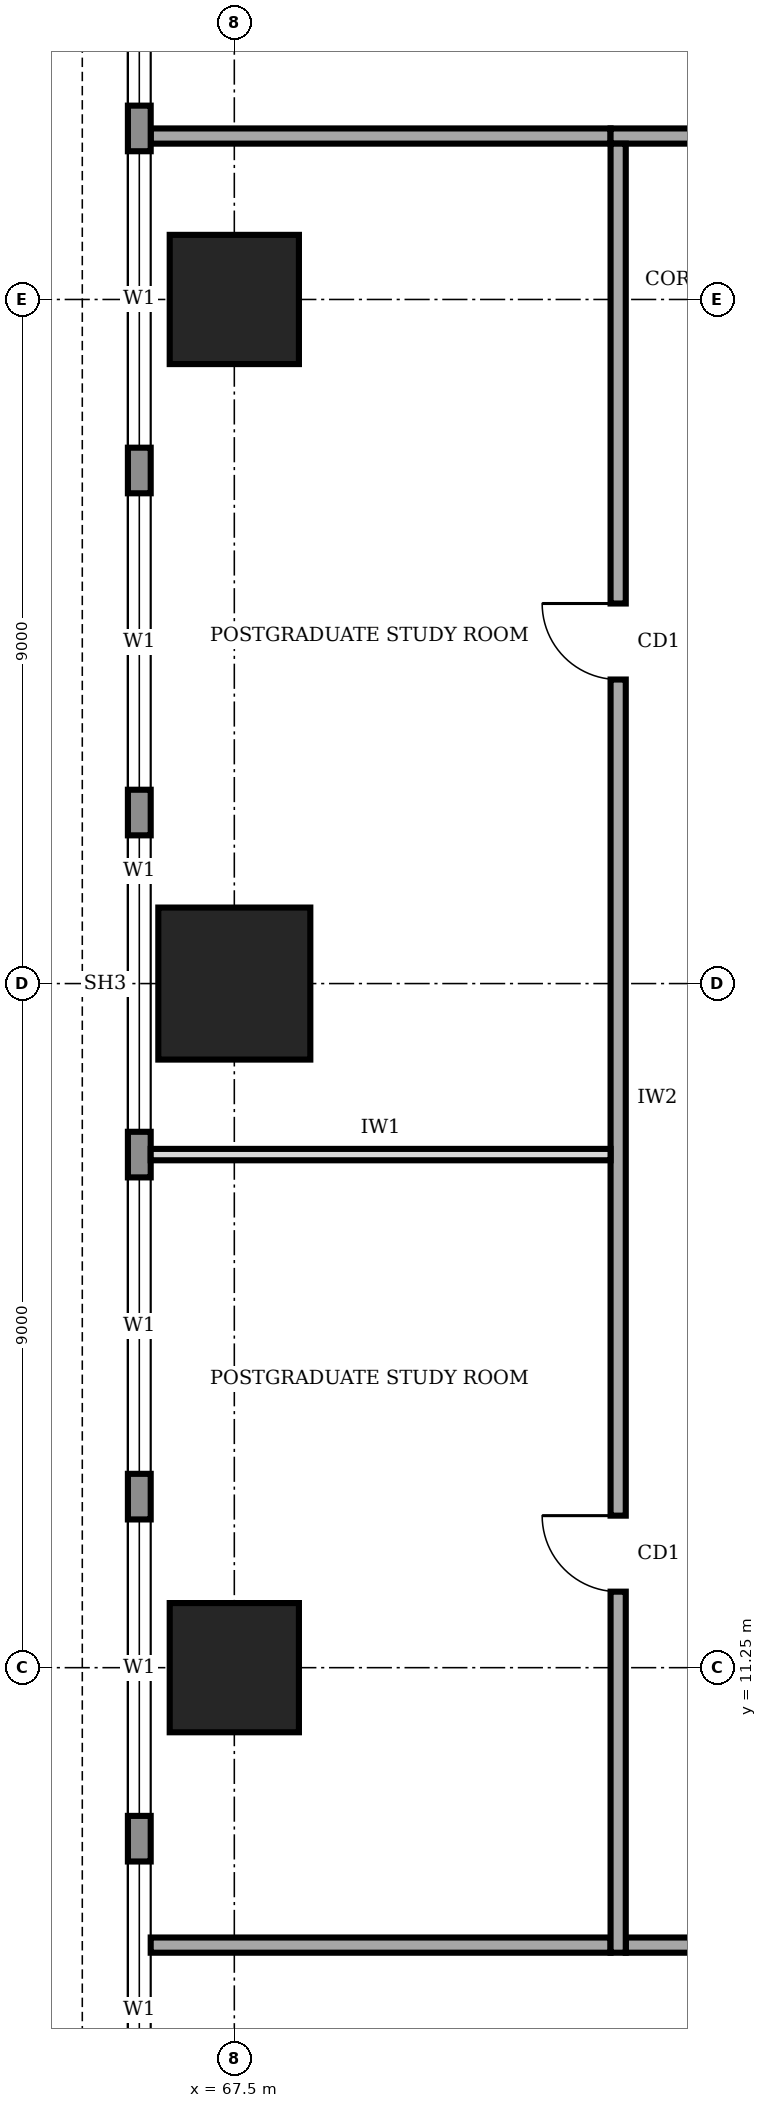
"""IFC4 building model, lengths in metres.
Left out: names, types, materials, properties, quantities, classifications, styles, units other than length and angle.
Written with IfcOpenShell. Run it as: python <this file> out.ifc"""

import sys

from ifc_helpers import new_model, si_unit, direction, frame, frame_2d, origin, origin_2d, place, context, subcontext, project, spatial, rectangle, extrude, element, fill, save


model = new_model("IFC4")
c1 = context("Model", 3, precision=1e-05, world=origin(), true_north=direction((0.0, 1.0)))
c2 = subcontext(c1, "Body", "Model", "MODEL_VIEW")
j1 = project(units=[si_unit("LENGTHUNIT", "METRE"), si_unit("PLANEANGLEUNIT", "RADIAN")], contexts=[c1])
p1 = place(None, origin())
s1 = spatial("IfcSite", under=j1, at=p1, CompositionType="ELEMENT")
p2 = place(p1, origin())
s2 = spatial("IfcBuilding", under=s1, at=p2, CompositionType="ELEMENT")
p3 = place(p2, frame((0.0, 0.0, 209.0)))
s3 = spatial("IfcBuildingStorey", under=s2, at=p3, CompositionType="ELEMENT", Elevation=209.0)
p4 = place(p3, frame((67.5, 11.25, 0.0), z_axis=(0.0, 0.0, 1.0), x_axis=(1.0, 0.0, 0.0)))
e1 = element("IfcColumn", 1, at=p4, inside=s3, PredefinedType="COLUMN", context=c2, shape_type="SweptSolid", body=[
    extrude(rectangle(XDim=1.7, YDim=1.7, at=origin_2d()), origin(), (0.0, 0.0, 1.0), 4.0),
])
p5 = place(p3, frame((67.5, 20.25, 0.0), z_axis=(0.0, 0.0, 1.0), x_axis=(1.0, 0.0, 0.0)))
e2 = element("IfcColumn", 2, at=p5, inside=s3, PredefinedType="COLUMN", context=c2, shape_type="SweptSolid", body=[
    extrude(rectangle(XDim=2.0, YDim=2.0, at=origin_2d()), origin(), (0.0, 0.0, 1.0), 4.0),
])
p6 = place(p3, frame((67.5, 29.25, 0.0), z_axis=(0.0, 0.0, 1.0), x_axis=(1.0, 0.0, 0.0)))
e3 = element("IfcColumn", 3, at=p6, inside=s3, PredefinedType="COLUMN", context=c2, shape_type="SweptSolid", body=[
    extrude(rectangle(XDim=1.7, YDim=1.7, at=origin_2d()), origin(), (0.0, 0.0, 1.0), 4.0),
])
p7 = place(p3, frame((66.25, 37.18, 0.0), z_axis=(0.0, 0.0, 1.0), x_axis=(0.0, -1.0, 0.0)))
e4 = element("IfcWall", 4, at=p7, inside=s3, PredefinedType="STANDARD", context=c2, shape_type="SweptSolid", body=[
    extrude(rectangle(XDim=33.86, YDim=0.3, at=frame_2d((16.93, 0.0))), origin(), (0.0, 0.0, 1.0), 3.75),
])
p8 = place(p7, frame((28.48, 0.0, 0.9)))
e5 = element("IfcOpeningElement", 5, at=p8, cuts=e4, PredefinedType="OPENING", context=c2, shape_type="SweptSolid", body=[
    extrude(rectangle(XDim=3.9, YDim=2.2, at=frame_2d((1.95, 1.1))), frame((0.0, 0.16, 0.0), z_axis=(0.0, -1.0, 0.0), x_axis=(1.0, 0.0, 0.0)), (0.0, 0.0, 1.0), 0.32),
])
p9 = place(p7, frame((23.98, 0.0, 0.9)))
e6 = element("IfcOpeningElement", 6, at=p9, cuts=e4, PredefinedType="OPENING", context=c2, shape_type="SweptSolid", body=[
    extrude(rectangle(XDim=3.9, YDim=2.2, at=frame_2d((1.95, 1.1))), frame((0.0, 0.16, 0.0), z_axis=(0.0, -1.0, 0.0), x_axis=(1.0, 0.0, 0.0)), (0.0, 0.0, 1.0), 0.32),
])
p10 = place(p7, frame((19.48, 0.0, 0.9)))
e7 = element("IfcOpeningElement", 7, at=p10, cuts=e4, PredefinedType="OPENING", context=c2, shape_type="SweptSolid", body=[
    extrude(rectangle(XDim=3.9, YDim=2.2, at=frame_2d((1.95, 1.1))), frame((0.0, 0.16, 0.0), z_axis=(0.0, -1.0, 0.0), x_axis=(1.0, 0.0, 0.0)), (0.0, 0.0, 1.0), 0.32),
])
p11 = place(p7, frame((14.98, 0.0, 0.9)))
e8 = element("IfcOpeningElement", 8, at=p11, cuts=e4, PredefinedType="OPENING", context=c2, shape_type="SweptSolid", body=[
    extrude(rectangle(XDim=3.9, YDim=2.2, at=frame_2d((1.95, 1.1))), frame((0.0, 0.16, 0.0), z_axis=(0.0, -1.0, 0.0), x_axis=(1.0, 0.0, 0.0)), (0.0, 0.0, 1.0), 0.32),
])
p12 = place(p7, frame((10.48, 0.0, 0.9)))
e9 = element("IfcOpeningElement", 9, at=p12, cuts=e4, PredefinedType="OPENING", context=c2, shape_type="SweptSolid", body=[
    extrude(rectangle(XDim=3.9, YDim=2.2, at=frame_2d((1.95, 1.1))), frame((0.0, 0.16, 0.0), z_axis=(0.0, -1.0, 0.0), x_axis=(1.0, 0.0, 0.0)), (0.0, 0.0, 1.0), 0.32),
])
p13 = place(p7, frame((5.98, 0.0, 0.9)))
e10 = element("IfcOpeningElement", 10, at=p13, cuts=e4, PredefinedType="OPENING", context=c2, shape_type="SweptSolid", body=[
    extrude(rectangle(XDim=3.9, YDim=2.2, at=frame_2d((1.95, 1.1))), frame((0.0, 0.16, 0.0), z_axis=(0.0, -1.0, 0.0), x_axis=(1.0, 0.0, 0.0)), (0.0, 0.0, 1.0), 0.32),
])
p14 = place(p7, frame((1.48, 0.0, 0.9)))
e11 = element("IfcOpeningElement", 11, at=p14, cuts=e4, PredefinedType="OPENING", context=c2, shape_type="SweptSolid", body=[
    extrude(rectangle(XDim=3.9, YDim=2.2, at=frame_2d((1.95, 1.1))), frame((0.0, 0.16, 0.0), z_axis=(0.0, -1.0, 0.0), x_axis=(1.0, 0.0, 0.0)), (0.0, 0.0, 1.0), 0.32),
])
p15 = place(p3, frame((72.65, 7.6, 0.0), z_axis=(0.0, 0.0, 1.0), x_axis=(1.0, 0.0, 0.0)))
e12 = element("IfcWall", 12, at=p15, inside=s3, PredefinedType="SOLIDWALL", context=c2, shape_type="SweptSolid", body=[
    extrude(rectangle(XDim=16.9, YDim=0.2, at=frame_2d((8.45, 0.0))), origin(), (0.0, 0.0, 1.0), 3.75),
])
p16 = place(p15, frame((7.45, 0.0, 0.0)))
e13 = element("IfcOpeningElement", 13, at=p16, cuts=e12, PredefinedType="OPENING", context=c2, shape_type="SweptSolid", body=[
    extrude(rectangle(XDim=1.8, YDim=2.1, at=frame_2d((0.9, 1.05))), frame((0.0, 0.11, 0.0), z_axis=(0.0, -1.0, 0.0), x_axis=(1.0, 0.0, 0.0)), (0.0, 0.0, 1.0), 0.22),
])
p17 = place(p3, frame((89.35, 31.4, 0.0), z_axis=(0.0, 0.0, 1.0), x_axis=(-1.0, 0.0, 0.0)))
e14 = element("IfcWall", 14, at=p17, inside=s3, PredefinedType="SOLIDWALL", context=c2, shape_type="SweptSolid", body=[
    extrude(rectangle(XDim=16.9, YDim=0.2, at=frame_2d((8.45, 0.0))), origin(), (0.0, 0.0, 1.0), 3.75),
])
p18 = place(p17, frame((14.375, 0.0, 0.0)))
e15 = element("IfcOpeningElement", 15, at=p18, cuts=e14, PredefinedType="OPENING", context=c2, shape_type="SweptSolid", body=[
    extrude(rectangle(XDim=1.0, YDim=2.1, at=frame_2d((0.5, 1.05))), frame((0.0, 0.11, 0.0), z_axis=(0.0, -1.0, 0.0), x_axis=(1.0, 0.0, 0.0)), (0.0, 0.0, 1.0), 0.22),
])
p19 = place(p17, frame((10.1, 0.0, 0.0)))
e16 = element("IfcOpeningElement", 16, at=p19, cuts=e14, PredefinedType="OPENING", context=c2, shape_type="SweptSolid", body=[
    extrude(rectangle(XDim=1.0, YDim=2.1, at=frame_2d((0.5, 1.05))), frame((0.0, 0.11, 0.0), z_axis=(0.0, -1.0, 0.0), x_axis=(1.0, 0.0, 0.0)), (0.0, 0.0, 1.0), 0.22),
])
p20 = place(p3, frame((72.55, 31.3, 0.0), z_axis=(0.0, 0.0, 1.0), x_axis=(0.0, -1.0, 0.0)))
e17 = element("IfcWall", 17, at=p20, inside=s3, PredefinedType="SOLIDWALL", context=c2, shape_type="SweptSolid", body=[
    extrude(rectangle(XDim=23.8, YDim=0.2, at=frame_2d((11.9, 0.0))), origin(), (0.0, 0.0, 1.0), 3.75),
])
p21 = place(p20, frame((18.05, 0.0, 0.0)))
e18 = element("IfcOpeningElement", 18, at=p21, cuts=e17, PredefinedType="OPENING", context=c2, shape_type="SweptSolid", body=[
    extrude(rectangle(XDim=1.0, YDim=2.1, at=frame_2d((0.5, 1.05))), frame((0.0, 0.11, 0.0), z_axis=(0.0, -1.0, 0.0), x_axis=(1.0, 0.0, 0.0)), (0.0, 0.0, 1.0), 0.22),
])
p22 = place(p20, frame((6.05, 0.0, 0.0)))
e19 = element("IfcOpeningElement", 19, at=p22, cuts=e17, PredefinedType="OPENING", context=c2, shape_type="SweptSolid", body=[
    extrude(rectangle(XDim=1.0, YDim=2.1, at=frame_2d((0.5, 1.05))), frame((0.0, 0.11, 0.0), z_axis=(0.0, -1.0, 0.0), x_axis=(1.0, 0.0, 0.0)), (0.0, 0.0, 1.0), 0.22),
])
for number, where, z_axis, x_axis in (
    (20, (66.4, 7.6, 0.0), (0.0, 0.0, 1.0), (1.0, 0.0, 0.0)),
    (21, (66.4, 31.4, 0.0), (0.0, 0.0, 1.0), (1.0, 0.0, 0.0)),
):
    element("IfcWall", number, at=place(p3, frame(where, z_axis=z_axis, x_axis=x_axis)), inside=s3, PredefinedType="SOLIDWALL", context=c2, shape_type="SweptSolid", body=[
        extrude(rectangle(XDim=6.05, YDim=0.2, at=frame_2d((3.025, 0.0))), origin(), (0.0, 0.0, 1.0), 3.75),
    ])
p23 = place(p3, frame((66.4, 18.0, 0.0), z_axis=(0.0, 0.0, 1.0), x_axis=(1.0, 0.0, 0.0)))
e22 = element("IfcWall", 22, at=p23, inside=s3, PredefinedType="PARTITIONING", context=c2, shape_type="SweptSolid", body=[
    extrude(rectangle(XDim=6.05, YDim=0.15, at=frame_2d((3.025, 0.0))), origin(), (0.0, 0.0, 1.0), 3.75),
])
p24 = place(p8, origin())
e23 = element("IfcWindow", 23, at=p24, inside=s3, PartitioningType="SINGLE_PANEL", PredefinedType="WINDOW", context=c2, shape_type="SweptSolid", body=[
    extrude(rectangle(XDim=3.9, YDim=2.2, at=frame_2d((1.95, 1.1))), frame((0.0, 0.03, 0.0), z_axis=(0.0, -1.0, 0.0), x_axis=(1.0, 0.0, 0.0)), (0.0, 0.0, 1.0), 0.06),
])
fill(e5, e23)
p25 = place(p9, origin())
e24 = element("IfcWindow", 24, at=p25, inside=s3, PartitioningType="SINGLE_PANEL", PredefinedType="WINDOW", context=c2, shape_type="SweptSolid", body=[
    extrude(rectangle(XDim=3.9, YDim=2.2, at=frame_2d((1.95, 1.1))), frame((0.0, 0.03, 0.0), z_axis=(0.0, -1.0, 0.0), x_axis=(1.0, 0.0, 0.0)), (0.0, 0.0, 1.0), 0.06),
])
fill(e6, e24)
p26 = place(p10, origin())
e25 = element("IfcWindow", 25, at=p26, inside=s3, PartitioningType="SINGLE_PANEL", PredefinedType="WINDOW", context=c2, shape_type="SweptSolid", body=[
    extrude(rectangle(XDim=3.9, YDim=2.2, at=frame_2d((1.95, 1.1))), frame((0.0, 0.03, 0.0), z_axis=(0.0, -1.0, 0.0), x_axis=(1.0, 0.0, 0.0)), (0.0, 0.0, 1.0), 0.06),
])
fill(e7, e25)
p27 = place(p11, origin())
e26 = element("IfcWindow", 26, at=p27, inside=s3, PartitioningType="SINGLE_PANEL", PredefinedType="WINDOW", context=c2, shape_type="SweptSolid", body=[
    extrude(rectangle(XDim=3.9, YDim=2.2, at=frame_2d((1.95, 1.1))), frame((0.0, 0.03, 0.0), z_axis=(0.0, -1.0, 0.0), x_axis=(1.0, 0.0, 0.0)), (0.0, 0.0, 1.0), 0.06),
])
fill(e8, e26)
p28 = place(p12, origin())
e27 = element("IfcWindow", 27, at=p28, inside=s3, PartitioningType="SINGLE_PANEL", PredefinedType="WINDOW", context=c2, shape_type="SweptSolid", body=[
    extrude(rectangle(XDim=3.9, YDim=2.2, at=frame_2d((1.95, 1.1))), frame((0.0, 0.03, 0.0), z_axis=(0.0, -1.0, 0.0), x_axis=(1.0, 0.0, 0.0)), (0.0, 0.0, 1.0), 0.06),
])
fill(e9, e27)
p29 = place(p13, origin())
e28 = element("IfcWindow", 28, at=p29, inside=s3, PartitioningType="SINGLE_PANEL", PredefinedType="WINDOW", context=c2, shape_type="SweptSolid", body=[
    extrude(rectangle(XDim=3.9, YDim=2.2, at=frame_2d((1.95, 1.1))), frame((0.0, 0.03, 0.0), z_axis=(0.0, -1.0, 0.0), x_axis=(1.0, 0.0, 0.0)), (0.0, 0.0, 1.0), 0.06),
])
fill(e10, e28)
p30 = place(p14, origin())
e29 = element("IfcWindow", 29, at=p30, inside=s3, PartitioningType="SINGLE_PANEL", PredefinedType="WINDOW", context=c2, shape_type="SweptSolid", body=[
    extrude(rectangle(XDim=3.9, YDim=2.2, at=frame_2d((1.95, 1.1))), frame((0.0, 0.03, 0.0), z_axis=(0.0, -1.0, 0.0), x_axis=(1.0, 0.0, 0.0)), (0.0, 0.0, 1.0), 0.06),
])
fill(e11, e29)
p31 = place(p21, frame((1.0, 0.0, 0.0), z_axis=(0.0, 0.0, 1.0), x_axis=(-1.0, 0.0, 0.0)))
e30 = element("IfcDoor", 30, at=p31, inside=s3, OperationType="SINGLE_SWING_RIGHT", PredefinedType="DOOR", context=c2, shape_type="SweptSolid", body=[
    extrude(rectangle(XDim=1.0, YDim=2.1, at=frame_2d((0.5, 1.05))), frame((0.0, 0.025, 0.0), z_axis=(0.0, -1.0, 0.0), x_axis=(1.0, 0.0, 0.0)), (0.0, 0.0, 1.0), 0.05),
])
fill(e18, e30)
p32 = place(p22, frame((1.0, 0.0, 0.0), z_axis=(0.0, 0.0, 1.0), x_axis=(-1.0, 0.0, 0.0)))
e31 = element("IfcDoor", 31, at=p32, inside=s3, OperationType="SINGLE_SWING_RIGHT", PredefinedType="DOOR", context=c2, shape_type="SweptSolid", body=[
    extrude(rectangle(XDim=1.0, YDim=2.1, at=frame_2d((0.5, 1.05))), frame((0.0, 0.025, 0.0), z_axis=(0.0, -1.0, 0.0), x_axis=(1.0, 0.0, 0.0)), (0.0, 0.0, 1.0), 0.05),
])
fill(e19, e31)
save(model, sys.argv[1])
